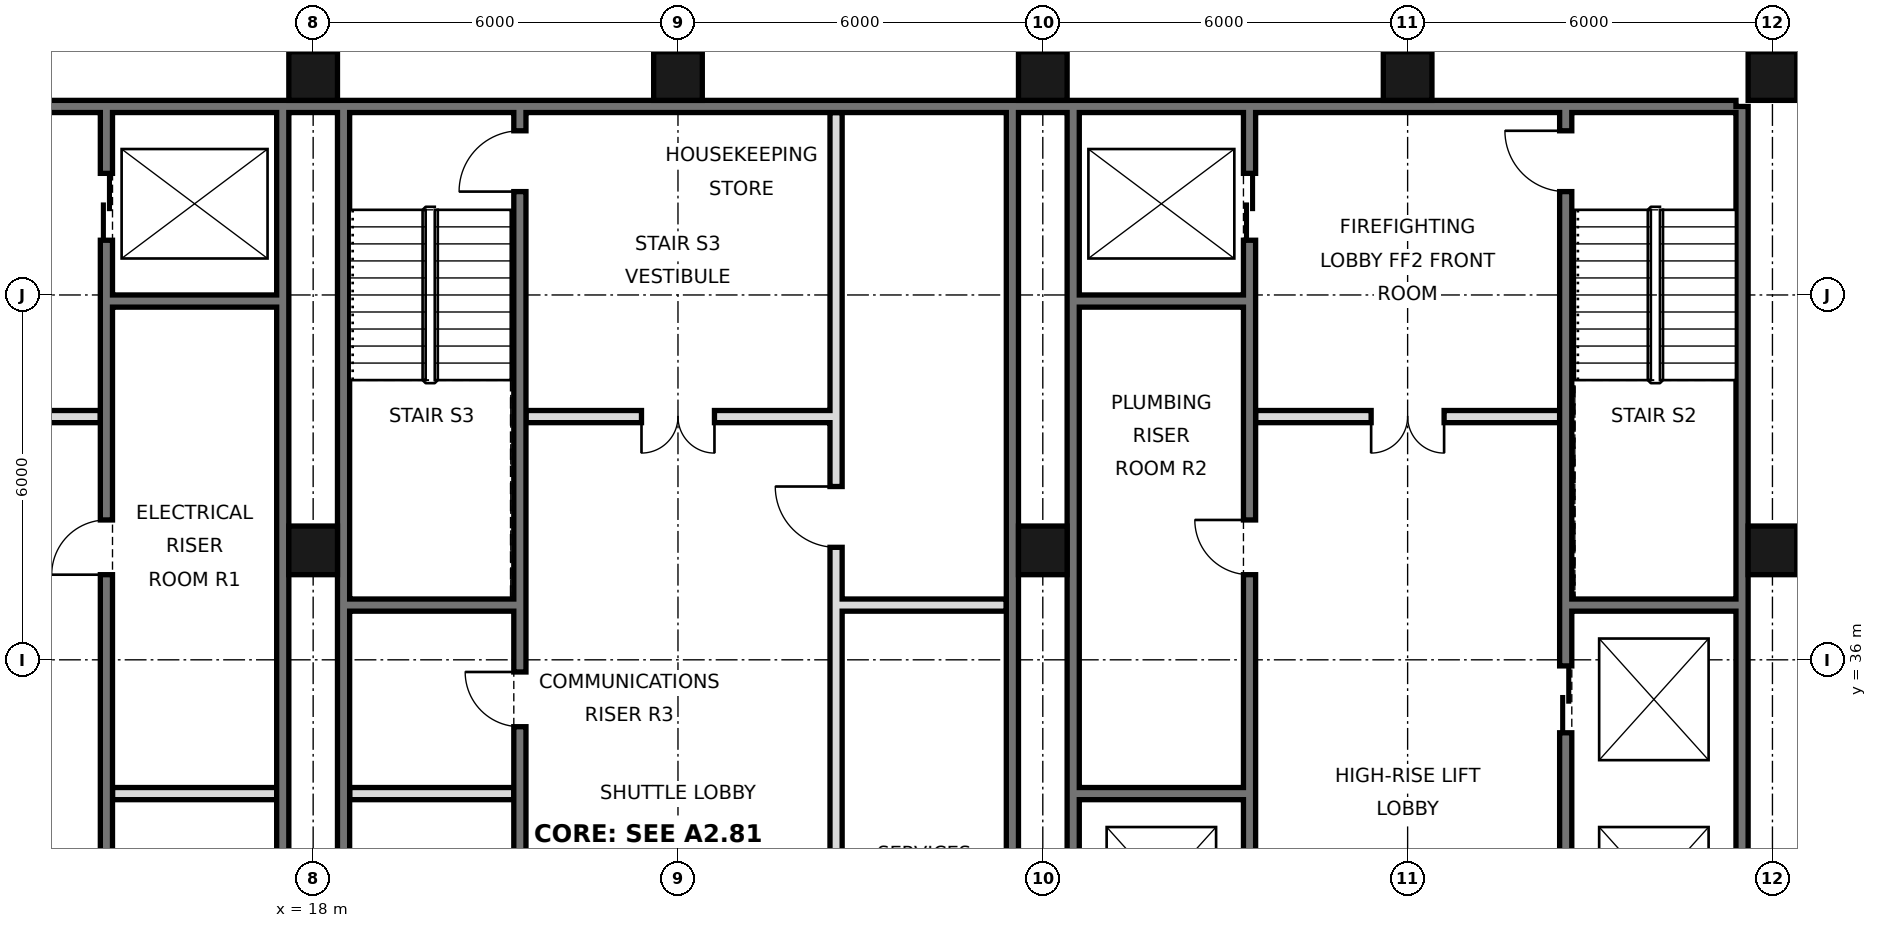
"""IFC4 building model, lengths in metres.
Left out: names, types, materials, properties, quantities, classifications, styles, units other than length and angle.
Written with IfcOpenShell. Run it as: python <this file> out.ifc"""

import sys

from ifc_helpers import new_model, si_unit, direction, frame, frame_2d, origin, origin_2d, place, context, subcontext, project, spatial, rectangle, hollow_rectangle, extrude, element, fill, save


model = new_model("IFC4")
c1 = context("Model", 3, precision=1e-05, world=origin(), true_north=direction((0.0, 1.0)))
c2 = subcontext(c1, "Body", "Model", "MODEL_VIEW")
j1 = project(units=[si_unit("LENGTHUNIT", "METRE"), si_unit("PLANEANGLEUNIT", "RADIAN")], contexts=[c1])
p1 = place(None, origin())
s1 = spatial("IfcSite", under=j1, at=p1, CompositionType="ELEMENT")
p2 = place(p1, origin())
s2 = spatial("IfcBuilding", under=s1, at=p2, CompositionType="ELEMENT")
p3 = place(p2, frame((0.0, 0.0, 323.2)))
s3 = spatial("IfcBuildingStorey", under=s2, at=p3, CompositionType="ELEMENT", Elevation=323.2)
for number, where, z_axis, x_axis in (
    (1, (18.0, 37.8, 0.0), (0.0, 0.0, 1.0), (1.0, 0.0, 0.0)),
    (2, (18.0, 45.6, 0.0), (0.0, 0.0, 1.0), (1.0, 0.0, 0.0)),
    (3, (24.0, 45.6, 0.0), (0.0, 0.0, 1.0), (1.0, 0.0, 0.0)),
    (4, (30.0, 37.8, 0.0), (0.0, 0.0, 1.0), (1.0, 0.0, 0.0)),
    (5, (30.0, 45.6, 0.0), (0.0, 0.0, 1.0), (1.0, 0.0, 0.0)),
    (6, (36.0, 45.6, 0.0), (0.0, 0.0, 1.0), (1.0, 0.0, 0.0)),
    (7, (42.0, 37.8, 0.0), (0.0, 0.0, 1.0), (1.0, 0.0, 0.0)),
    (8, (42.0, 45.6, 0.0), (0.0, 0.0, 1.0), (1.0, 0.0, 0.0)),
):
    element("IfcColumn", number, at=place(p3, frame(where, z_axis=z_axis, x_axis=x_axis)), inside=s3, PredefinedType="COLUMN", context=c2, shape_type="SweptSolid", body=[
        extrude(hollow_rectangle(XDim=0.8, YDim=0.8, WallThickness=0.025, at=origin_2d()), origin(), (0.0, 0.0, 1.0), 3.6),
    ])
p4 = place(p3, frame((41.5, 21.6, 0.0), z_axis=(0.0, 0.0, 1.0), x_axis=(0.0, 1.0, 0.0)))
e9 = element("IfcWall", 9, at=p4, inside=s3, PredefinedType="SOLIDWALL", context=c2, shape_type="SweptSolid", body=[
    extrude(rectangle(XDim=23.5, YDim=0.2, at=frame_2d((11.75, 0.0))), origin(), (0.0, 0.0, 1.0), 3.42),
])
p5 = place(p3, frame((6.6, 45.1, 0.0), z_axis=(0.0, 0.0, 1.0), x_axis=(1.0, 0.0, 0.0)))
e10 = element("IfcWall", 10, at=p5, inside=s3, PredefinedType="SOLIDWALL", context=c2, shape_type="SweptSolid", body=[
    extrude(rectangle(XDim=34.8, YDim=0.2, at=frame_2d((17.4, 0.0))), origin(), (0.0, 0.0, 1.0), 3.42),
])
for number, where, z_axis, x_axis in (
    (11, (17.5, 27.6, 0.0), (0.0, 0.0, 1.0), (0.0, 1.0, 0.0)),
    (12, (18.5, 27.6, 0.0), (0.0, 0.0, 1.0), (0.0, 1.0, 0.0)),
    (13, (29.5, 27.6, 0.0), (0.0, 0.0, 1.0), (0.0, 1.0, 0.0)),
    (14, (30.5, 27.6, 0.0), (0.0, 0.0, 1.0), (0.0, 1.0, 0.0)),
):
    element("IfcWall", number, at=place(p3, frame(where, z_axis=z_axis, x_axis=x_axis)), inside=s3, PredefinedType="SOLIDWALL", context=c2, shape_type="SweptSolid", body=[
        extrude(rectangle(XDim=17.5, YDim=0.2, at=frame_2d((8.75, 0.0))), origin(), (0.0, 0.0, 1.0), 3.42),
    ])
p6 = place(p3, frame((14.6, 27.5, 0.0), z_axis=(0.0, 0.0, 1.0), x_axis=(0.0, 1.0, 0.0)))
e15 = element("IfcWall", 15, at=p6, inside=s3, PredefinedType="SOLIDWALL", context=c2, shape_type="SweptSolid", body=[
    extrude(rectangle(XDim=17.5, YDim=0.2, at=frame_2d((8.75, 0.0))), origin(), (0.0, 0.0, 1.0), 3.42),
])
p7 = place(p6, frame((15.4, 0.0, 0.0)))
e16 = element("IfcOpeningElement", 16, at=p7, cuts=e15, PredefinedType="OPENING", context=c2, shape_type="SweptSolid", body=[
    extrude(rectangle(XDim=1.1, YDim=2.1, at=frame_2d((0.55, 1.05))), frame((0.0, 0.11, 0.0), z_axis=(0.0, -1.0, 0.0), x_axis=(1.0, 0.0, 0.0)), (0.0, 0.0, 1.0), 0.22),
])
p8 = place(p6, frame((2.7, 0.0, 0.0)))
e17 = element("IfcOpeningElement", 17, at=p8, cuts=e15, PredefinedType="OPENING", context=c2, shape_type="SweptSolid", body=[
    extrude(rectangle(XDim=1.0, YDim=2.1, at=frame_2d((0.5, 1.05))), frame((0.0, 0.11, 0.0), z_axis=(0.0, -1.0, 0.0), x_axis=(1.0, 0.0, 0.0)), (0.0, 0.0, 1.0), 0.22),
])
p9 = place(p6, frame((9.9, 0.0, 0.0)))
e18 = element("IfcOpeningElement", 18, at=p9, cuts=e15, PredefinedType="OPENING", context=c2, shape_type="SweptSolid", body=[
    extrude(rectangle(XDim=0.9, YDim=2.1, at=frame_2d((0.45, 1.05))), frame((0.0, 0.11, 0.0), z_axis=(0.0, -1.0, 0.0), x_axis=(1.0, 0.0, 0.0)), (0.0, 0.0, 1.0), 0.22),
])
p10 = place(p3, frame((21.4, 27.5, 0.0), z_axis=(0.0, 0.0, 1.0), x_axis=(0.0, 1.0, 0.0)))
e19 = element("IfcWall", 19, at=p10, inside=s3, PredefinedType="SOLIDWALL", context=c2, shape_type="SweptSolid", body=[
    extrude(rectangle(XDim=17.5, YDim=0.2, at=frame_2d((8.75, 0.0))), origin(), (0.0, 0.0, 1.0), 3.42),
])
p11 = place(p10, frame((0.6, 0.0, 0.0)))
e20 = element("IfcOpeningElement", 20, at=p11, cuts=e19, PredefinedType="OPENING", context=c2, shape_type="SweptSolid", body=[
    extrude(rectangle(XDim=1.0, YDim=2.1, at=frame_2d((0.5, 1.05))), frame((0.0, 0.11, 0.0), z_axis=(0.0, -1.0, 0.0), x_axis=(1.0, 0.0, 0.0)), (0.0, 0.0, 1.0), 0.22),
])
p12 = place(p10, frame((3.7, 0.0, 0.0)))
e21 = element("IfcOpeningElement", 21, at=p12, cuts=e19, PredefinedType="OPENING", context=c2, shape_type="SweptSolid", body=[
    extrude(rectangle(XDim=1.0, YDim=2.1, at=frame_2d((0.5, 1.05))), frame((0.0, 0.11, 0.0), z_axis=(0.0, -1.0, 0.0), x_axis=(1.0, 0.0, 0.0)), (0.0, 0.0, 1.0), 0.22),
])
p13 = place(p10, frame((16.2, 0.0, 0.0)))
e22 = element("IfcOpeningElement", 22, at=p13, cuts=e19, PredefinedType="OPENING", context=c2, shape_type="SweptSolid", body=[
    extrude(rectangle(XDim=1.0, YDim=2.1, at=frame_2d((0.5, 1.05))), frame((0.0, 0.11, 0.0), z_axis=(0.0, -1.0, 0.0), x_axis=(1.0, 0.0, 0.0)), (0.0, 0.0, 1.0), 0.22),
])
p14 = place(p10, frame((7.4, 0.0, 0.0)))
e23 = element("IfcOpeningElement", 23, at=p14, cuts=e19, PredefinedType="OPENING", context=c2, shape_type="SweptSolid", body=[
    extrude(rectangle(XDim=0.9, YDim=2.1, at=frame_2d((0.45, 1.05))), frame((0.0, 0.11, 0.0), z_axis=(0.0, -1.0, 0.0), x_axis=(1.0, 0.0, 0.0)), (0.0, 0.0, 1.0), 0.22),
])
p15 = place(p3, frame((26.6, 27.5, 0.0), z_axis=(0.0, 0.0, 1.0), x_axis=(0.0, 1.0, 0.0)))
e24 = element("IfcWall", 24, at=p15, inside=s3, PredefinedType="SOLIDWALL", context=c2, shape_type="SweptSolid", body=[
    extrude(rectangle(XDim=17.5, YDim=0.2, at=frame_2d((8.75, 0.0))), origin(), (0.0, 0.0, 1.0), 3.42),
])
p16 = place(p15, frame((4.3, 0.0, 0.0)))
e25 = element("IfcOpeningElement", 25, at=p16, cuts=e24, PredefinedType="OPENING", context=c2, shape_type="SweptSolid", body=[
    extrude(rectangle(XDim=0.9, YDim=2.1, at=frame_2d((0.45, 1.05))), frame((0.0, 0.11, 0.0), z_axis=(0.0, -1.0, 0.0), x_axis=(1.0, 0.0, 0.0)), (0.0, 0.0, 1.0), 0.22),
])
p17 = place(p15, frame((10.35, 0.0, 0.0)))
e26 = element("IfcOpeningElement", 26, at=p17, cuts=e24, PredefinedType="OPENING", context=c2, shape_type="SweptSolid", body=[
    extrude(rectangle(XDim=1.0, YDim=2.1, at=frame_2d((0.5, 1.05))), frame((0.0, 0.11, 0.0), z_axis=(0.0, -1.0, 0.0), x_axis=(1.0, 0.0, 0.0)), (0.0, 0.0, 1.0), 0.22),
])
p18 = place(p3, frame((33.4, 27.5, 0.0), z_axis=(0.0, 0.0, 1.0), x_axis=(0.0, 1.0, 0.0)))
e27 = element("IfcWall", 27, at=p18, inside=s3, PredefinedType="SOLIDWALL", context=c2, shape_type="SweptSolid", body=[
    extrude(rectangle(XDim=17.5, YDim=0.2, at=frame_2d((8.75, 0.0))), origin(), (0.0, 0.0, 1.0), 3.42),
])
p19 = place(p18, frame((1.1, 0.0, 0.0)))
e28 = element("IfcOpeningElement", 28, at=p19, cuts=e27, PredefinedType="OPENING", context=c2, shape_type="SweptSolid", body=[
    extrude(rectangle(XDim=1.1, YDim=2.1, at=frame_2d((0.55, 1.05))), frame((0.0, 0.11, 0.0), z_axis=(0.0, -1.0, 0.0), x_axis=(1.0, 0.0, 0.0)), (0.0, 0.0, 1.0), 0.22),
])
p20 = place(p18, frame((4.2, 0.0, 0.0)))
e29 = element("IfcOpeningElement", 29, at=p20, cuts=e27, PredefinedType="OPENING", context=c2, shape_type="SweptSolid", body=[
    extrude(rectangle(XDim=1.1, YDim=2.1, at=frame_2d((0.55, 1.05))), frame((0.0, 0.11, 0.0), z_axis=(0.0, -1.0, 0.0), x_axis=(1.0, 0.0, 0.0)), (0.0, 0.0, 1.0), 0.22),
])
p21 = place(p18, frame((15.4, 0.0, 0.0)))
e30 = element("IfcOpeningElement", 30, at=p21, cuts=e27, PredefinedType="OPENING", context=c2, shape_type="SweptSolid", body=[
    extrude(rectangle(XDim=1.1, YDim=2.1, at=frame_2d((0.55, 1.05))), frame((0.0, 0.11, 0.0), z_axis=(0.0, -1.0, 0.0), x_axis=(1.0, 0.0, 0.0)), (0.0, 0.0, 1.0), 0.22),
])
p22 = place(p18, frame((9.9, 0.0, 0.0)))
e31 = element("IfcOpeningElement", 31, at=p22, cuts=e27, PredefinedType="OPENING", context=c2, shape_type="SweptSolid", body=[
    extrude(rectangle(XDim=0.9, YDim=2.1, at=frame_2d((0.45, 1.05))), frame((0.0, 0.11, 0.0), z_axis=(0.0, -1.0, 0.0), x_axis=(1.0, 0.0, 0.0)), (0.0, 0.0, 1.0), 0.22),
])
p23 = place(p3, frame((38.6, 21.6, 0.0), z_axis=(0.0, 0.0, 1.0), x_axis=(0.0, 1.0, 0.0)))
e32 = element("IfcWall", 32, at=p23, inside=s3, PredefinedType="SOLIDWALL", context=c2, shape_type="SweptSolid", body=[
    extrude(rectangle(XDim=23.4, YDim=0.2, at=frame_2d((11.7, 0.0))), origin(), (0.0, 0.0, 1.0), 3.42),
])
p24 = place(p23, frame((7.0, 0.0, 0.0)))
e33 = element("IfcOpeningElement", 33, at=p24, cuts=e32, PredefinedType="OPENING", context=c2, shape_type="SweptSolid", body=[
    extrude(rectangle(XDim=1.1, YDim=2.1, at=frame_2d((0.55, 1.05))), frame((0.0, 0.11, 0.0), z_axis=(0.0, -1.0, 0.0), x_axis=(1.0, 0.0, 0.0)), (0.0, 0.0, 1.0), 0.22),
])
p25 = place(p23, frame((10.1, 0.0, 0.0)))
e34 = element("IfcOpeningElement", 34, at=p25, cuts=e32, PredefinedType="OPENING", context=c2, shape_type="SweptSolid", body=[
    extrude(rectangle(XDim=1.1, YDim=2.1, at=frame_2d((0.55, 1.05))), frame((0.0, 0.11, 0.0), z_axis=(0.0, -1.0, 0.0), x_axis=(1.0, 0.0, 0.0)), (0.0, 0.0, 1.0), 0.22),
])
p26 = place(p23, frame((13.2, 0.0, 0.0)))
e35 = element("IfcOpeningElement", 35, at=p26, cuts=e32, PredefinedType="OPENING", context=c2, shape_type="SweptSolid", body=[
    extrude(rectangle(XDim=1.1, YDim=2.1, at=frame_2d((0.55, 1.05))), frame((0.0, 0.11, 0.0), z_axis=(0.0, -1.0, 0.0), x_axis=(1.0, 0.0, 0.0)), (0.0, 0.0, 1.0), 0.22),
])
p27 = place(p23, frame((22.1, 0.0, 0.0)))
e36 = element("IfcOpeningElement", 36, at=p27, cuts=e32, PredefinedType="OPENING", context=c2, shape_type="SweptSolid", body=[
    extrude(rectangle(XDim=1.0, YDim=2.1, at=frame_2d((0.5, 1.05))), frame((0.0, 0.11, 0.0), z_axis=(0.0, -1.0, 0.0), x_axis=(1.0, 0.0, 0.0)), (0.0, 0.0, 1.0), 0.22),
])
p28 = place(p23, frame((0.175, 0.0, 0.0)))
e37 = element("IfcOpeningElement", 37, at=p28, cuts=e32, PredefinedType="OPENING", context=c2, shape_type="SweptSolid", body=[
    extrude(rectangle(XDim=0.9, YDim=2.1, at=frame_2d((0.45, 1.05))), frame((0.0, 0.11, 0.0), z_axis=(0.0, -1.0, 0.0), x_axis=(1.0, 0.0, 0.0)), (0.0, 0.0, 1.0), 0.22),
])
for number, where, z_axis, x_axis in (
    (38, (14.7, 33.8, 0.0), (0.0, 0.0, 1.0), (1.0, 0.0, 0.0)),
    (39, (18.6, 33.8, 0.0), (0.0, 0.0, 1.0), (1.0, 0.0, 0.0)),
    (40, (30.6, 33.8, 0.0), (0.0, 0.0, 1.0), (1.0, 0.0, 0.0)),
    (41, (18.6, 36.9, 0.0), (0.0, 0.0, 1.0), (1.0, 0.0, 0.0)),
    (42, (26.7, 36.9, 0.0), (0.0, 0.0, 1.0), (1.0, 0.0, 0.0)),
    (43, (38.7, 36.9, 0.0), (0.0, 0.0, 1.0), (1.0, 0.0, 0.0)),
):
    element("IfcWall", number, at=place(p3, frame(where, z_axis=z_axis, x_axis=x_axis)), inside=s3, PredefinedType="SOLIDWALL", context=c2, shape_type="SweptSolid", body=[
        extrude(rectangle(XDim=2.7, YDim=0.2, at=frame_2d((1.35, 0.0))), origin(), (0.0, 0.0, 1.0), 3.42),
    ])
p29 = place(p3, frame((21.5, 40.0, 0.0), z_axis=(0.0, 0.0, 1.0), x_axis=(1.0, 0.0, 0.0)))
e44 = element("IfcWall", 44, at=p29, inside=s3, PredefinedType="PARTITIONING", context=c2, shape_type="SweptSolid", body=[
    extrude(rectangle(XDim=5.0, YDim=0.2, at=frame_2d((2.5, 0.0))), origin(), (0.0, 0.0, 1.0), 3.42),
])
p30 = place(p29, frame((1.9, 0.0, 0.0)))
e45 = element("IfcOpeningElement", 45, at=p30, cuts=e44, PredefinedType="OPENING", context=c2, shape_type="SweptSolid", body=[
    extrude(rectangle(XDim=1.2, YDim=2.1, at=frame_2d((0.6, 1.05))), frame((0.0, 0.11, 0.0), z_axis=(0.0, -1.0, 0.0), x_axis=(1.0, 0.0, 0.0)), (0.0, 0.0, 1.0), 0.22),
])
p31 = place(p3, frame((33.5, 40.0, 0.0), z_axis=(0.0, 0.0, 1.0), x_axis=(1.0, 0.0, 0.0)))
e46 = element("IfcWall", 46, at=p31, inside=s3, PredefinedType="PARTITIONING", context=c2, shape_type="SweptSolid", body=[
    extrude(rectangle(XDim=5.0, YDim=0.2, at=frame_2d((2.5, 0.0))), origin(), (0.0, 0.0, 1.0), 3.42),
])
p32 = place(p31, frame((1.9, 0.0, 0.0)))
e47 = element("IfcOpeningElement", 47, at=p32, cuts=e46, PredefinedType="OPENING", context=c2, shape_type="SweptSolid", body=[
    extrude(rectangle(XDim=1.2, YDim=2.1, at=frame_2d((0.6, 1.05))), frame((0.0, 0.11, 0.0), z_axis=(0.0, -1.0, 0.0), x_axis=(1.0, 0.0, 0.0)), (0.0, 0.0, 1.0), 0.22),
])
p33 = place(p3, frame((9.5, 40.0, 0.0), z_axis=(0.0, 0.0, 1.0), x_axis=(1.0, 0.0, 0.0)))
e48 = element("IfcWall", 48, at=p33, inside=s3, PredefinedType="PARTITIONING", context=c2, shape_type="SweptSolid", body=[
    extrude(rectangle(XDim=5.0, YDim=0.2, at=frame_2d((2.5, 0.0))), origin(), (0.0, 0.0, 1.0), 3.42),
])
p34 = place(p33, frame((1.9, 0.0, 0.0)))
e49 = element("IfcOpeningElement", 49, at=p34, cuts=e48, PredefinedType="OPENING", context=c2, shape_type="SweptSolid", body=[
    extrude(rectangle(XDim=1.2, YDim=2.1, at=frame_2d((0.6, 1.05))), frame((0.0, 0.11, 0.0), z_axis=(0.0, -1.0, 0.0), x_axis=(1.0, 0.0, 0.0)), (0.0, 0.0, 1.0), 0.22),
])
for number, where, z_axis, x_axis in (
    (50, (14.7, 41.9, 0.0), (0.0, 0.0, 1.0), (1.0, 0.0, 0.0)),
    (51, (30.6, 41.9, 0.0), (0.0, 0.0, 1.0), (1.0, 0.0, 0.0)),
):
    element("IfcWall", number, at=place(p3, frame(where, z_axis=z_axis, x_axis=x_axis)), inside=s3, PredefinedType="SOLIDWALL", context=c2, shape_type="SweptSolid", body=[
        extrude(rectangle(XDim=2.7, YDim=0.2, at=frame_2d((1.35, 0.0))), origin(), (0.0, 0.0, 1.0), 3.42),
    ])
p35 = place(p30, frame((1.2, 0.0, 0.0), z_axis=(0.0, 0.0, 1.0), x_axis=(-1.0, 0.0, 0.0)))
e52 = element("IfcDoor", 52, at=p35, inside=s3, OperationType="DOUBLE_DOOR_SINGLE_SWING", PredefinedType="DOOR", context=c2, shape_type="SweptSolid", body=[
    extrude(rectangle(XDim=1.2, YDim=2.1, at=frame_2d((0.6, 1.05))), frame((0.0, 0.025, 0.0), z_axis=(0.0, -1.0, 0.0), x_axis=(1.0, 0.0, 0.0)), (0.0, 0.0, 1.0), 0.05),
])
fill(e45, e52)
p36 = place(p32, frame((1.2, 0.0, 0.0), z_axis=(0.0, 0.0, 1.0), x_axis=(-1.0, 0.0, 0.0)))
e53 = element("IfcDoor", 53, at=p36, inside=s3, OperationType="DOUBLE_DOOR_SINGLE_SWING", PredefinedType="DOOR", context=c2, shape_type="SweptSolid", body=[
    extrude(rectangle(XDim=1.2, YDim=2.1, at=frame_2d((0.6, 1.05))), frame((0.0, 0.025, 0.0), z_axis=(0.0, -1.0, 0.0), x_axis=(1.0, 0.0, 0.0)), (0.0, 0.0, 1.0), 0.05),
])
fill(e47, e53)
p37 = place(p26, origin())
e54 = element("IfcDoor", 54, at=p37, inside=s3, OperationType="DOUBLE_DOOR_SLIDING", PredefinedType="DOOR", context=c2, shape_type="SweptSolid", body=[
    extrude(rectangle(XDim=1.1, YDim=2.1, at=frame_2d((0.55, 1.05))), frame((0.0, 0.025, 0.0), z_axis=(0.0, -1.0, 0.0), x_axis=(1.0, 0.0, 0.0)), (0.0, 0.0, 1.0), 0.05),
])
fill(e35, e54)
p38 = place(p21, origin())
e55 = element("IfcDoor", 55, at=p38, inside=s3, OperationType="DOUBLE_DOOR_SLIDING", PredefinedType="DOOR", context=c2, shape_type="SweptSolid", body=[
    extrude(rectangle(XDim=1.1, YDim=2.1, at=frame_2d((0.55, 1.05))), frame((0.0, 0.025, 0.0), z_axis=(0.0, -1.0, 0.0), x_axis=(1.0, 0.0, 0.0)), (0.0, 0.0, 1.0), 0.05),
])
fill(e30, e55)
p39 = place(p7, origin())
e56 = element("IfcDoor", 56, at=p39, inside=s3, OperationType="DOUBLE_DOOR_SLIDING", PredefinedType="DOOR", context=c2, shape_type="SweptSolid", body=[
    extrude(rectangle(XDim=1.1, YDim=2.1, at=frame_2d((0.55, 1.05))), frame((0.0, 0.025, 0.0), z_axis=(0.0, -1.0, 0.0), x_axis=(1.0, 0.0, 0.0)), (0.0, 0.0, 1.0), 0.05),
])
fill(e16, e56)
p40 = place(p27, frame((1.0, 0.0, 0.0), z_axis=(0.0, 0.0, 1.0), x_axis=(-1.0, 0.0, 0.0)))
e57 = element("IfcDoor", 57, at=p40, inside=s3, OperationType="SINGLE_SWING_LEFT", PredefinedType="DOOR", context=c2, shape_type="SweptSolid", body=[
    extrude(rectangle(XDim=1.0, YDim=2.1, at=frame_2d((0.5, 1.05))), frame((0.0, 0.025, 0.0), z_axis=(0.0, -1.0, 0.0), x_axis=(1.0, 0.0, 0.0)), (0.0, 0.0, 1.0), 0.05),
])
fill(e36, e57)
p41 = place(p13, origin())
e58 = element("IfcDoor", 58, at=p41, inside=s3, OperationType="SINGLE_SWING_LEFT", PredefinedType="DOOR", context=c2, shape_type="SweptSolid", body=[
    extrude(rectangle(XDim=1.0, YDim=2.1, at=frame_2d((0.5, 1.05))), frame((0.0, 0.025, 0.0), z_axis=(0.0, -1.0, 0.0), x_axis=(1.0, 0.0, 0.0)), (0.0, 0.0, 1.0), 0.05),
])
fill(e22, e58)
p42 = place(p9, origin())
e59 = element("IfcDoor", 59, at=p42, inside=s3, OperationType="SINGLE_SWING_LEFT", PredefinedType="DOOR", context=c2, shape_type="SweptSolid", body=[
    extrude(rectangle(XDim=0.9, YDim=2.1, at=frame_2d((0.45, 1.05))), frame((0.0, 0.025, 0.0), z_axis=(0.0, -1.0, 0.0), x_axis=(1.0, 0.0, 0.0)), (0.0, 0.0, 1.0), 0.05),
])
fill(e18, e59)
p43 = place(p22, frame((0.9, 0.0, 0.0), z_axis=(0.0, 0.0, 1.0), x_axis=(-1.0, 0.0, 0.0)))
e60 = element("IfcDoor", 60, at=p43, inside=s3, OperationType="SINGLE_SWING_LEFT", PredefinedType="DOOR", context=c2, shape_type="SweptSolid", body=[
    extrude(rectangle(XDim=0.9, YDim=2.1, at=frame_2d((0.45, 1.05))), frame((0.0, 0.025, 0.0), z_axis=(0.0, -1.0, 0.0), x_axis=(1.0, 0.0, 0.0)), (0.0, 0.0, 1.0), 0.05),
])
fill(e31, e60)
p44 = place(p14, frame((0.9, 0.0, 0.0), z_axis=(0.0, 0.0, 1.0), x_axis=(-1.0, 0.0, 0.0)))
e61 = element("IfcDoor", 61, at=p44, inside=s3, OperationType="SINGLE_SWING_LEFT", PredefinedType="DOOR", context=c2, shape_type="SweptSolid", body=[
    extrude(rectangle(XDim=0.9, YDim=2.1, at=frame_2d((0.45, 1.05))), frame((0.0, 0.025, 0.0), z_axis=(0.0, -1.0, 0.0), x_axis=(1.0, 0.0, 0.0)), (0.0, 0.0, 1.0), 0.05),
])
fill(e23, e61)
p45 = place(p17, frame((1.0, 0.0, 0.0), z_axis=(0.0, 0.0, 1.0), x_axis=(-1.0, 0.0, 0.0)))
e62 = element("IfcDoor", 62, at=p45, inside=s3, OperationType="SINGLE_SWING_LEFT", PredefinedType="DOOR", context=c2, shape_type="SweptSolid", body=[
    extrude(rectangle(XDim=1.0, YDim=2.1, at=frame_2d((0.5, 1.05))), frame((0.0, 0.025, 0.0), z_axis=(0.0, -1.0, 0.0), x_axis=(1.0, 0.0, 0.0)), (0.0, 0.0, 1.0), 0.05),
])
fill(e26, e62)
save(model, sys.argv[1])
